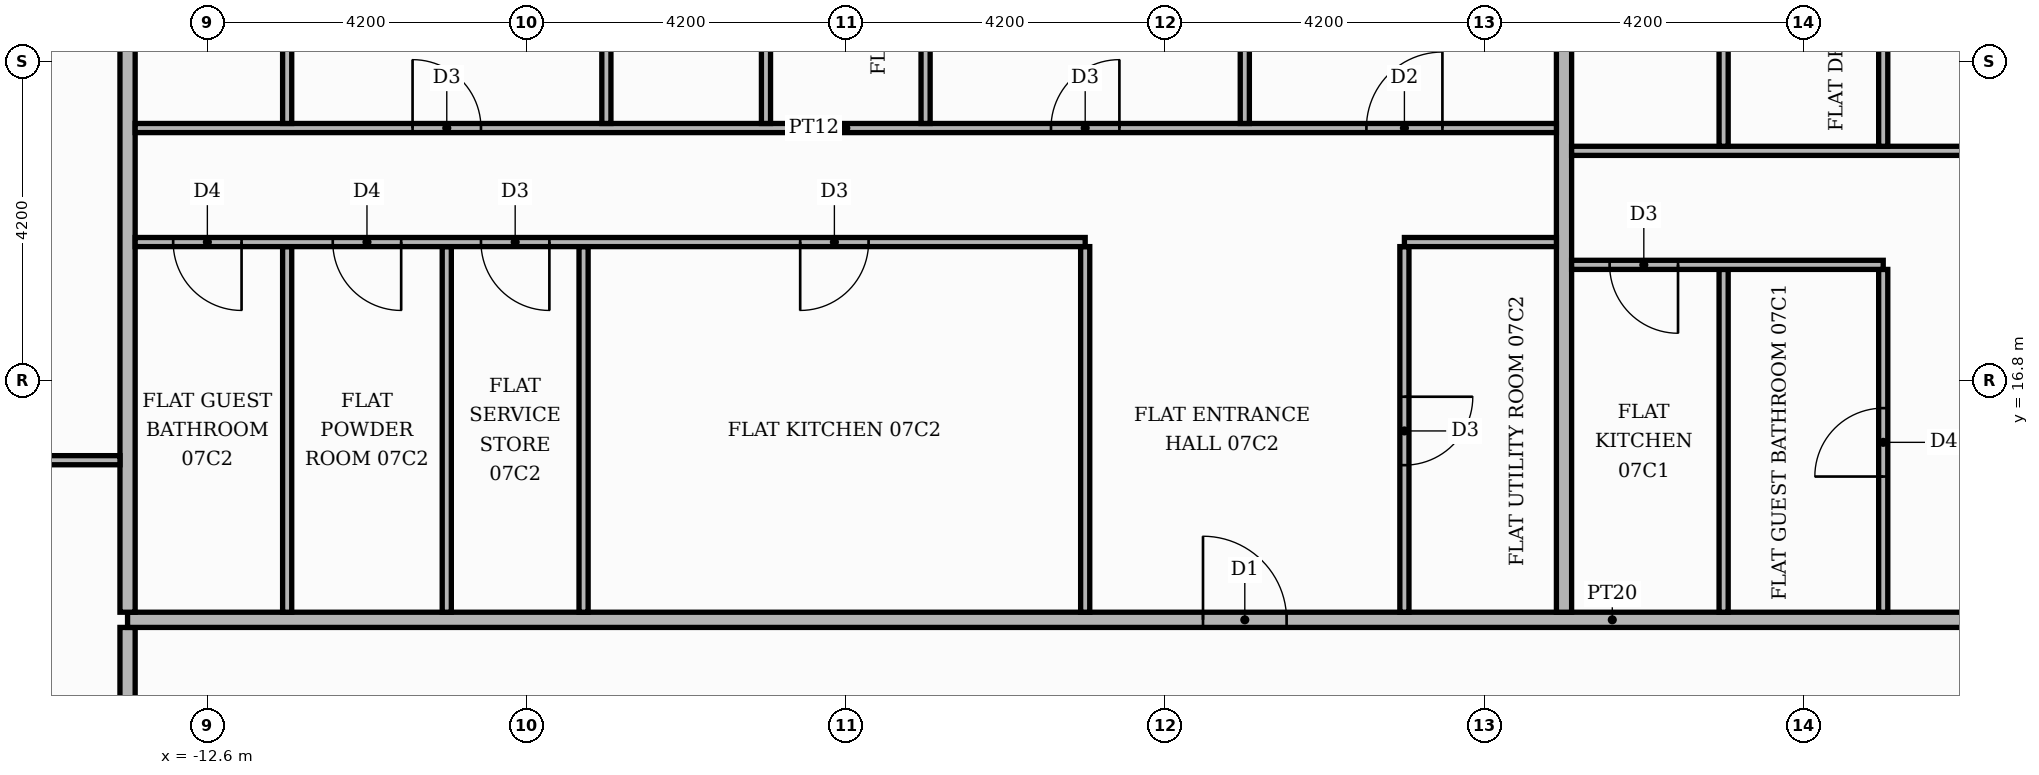
"""IFC4 building model, lengths in metres.
Left out: names, types, materials, properties, quantities, classifications, styles, units other than length and angle.
Written with IfcOpenShell. Run it as: python <this file> out.ifc"""

import sys

from ifc_helpers import new_model, si_unit, direction, frame, frame_2d, origin, place, context, subcontext, project, spatial, rectangle, extrude, element, fill, save


model = new_model("IFC4")
c1 = context("Model", 3, precision=1e-05, world=origin(), true_north=direction((0.0, 1.0)))
c2 = subcontext(c1, "Body", "Model", "MODEL_VIEW")
j1 = project(units=[si_unit("LENGTHUNIT", "METRE"), si_unit("PLANEANGLEUNIT", "RADIAN")], contexts=[c1])
p1 = place(None, origin())
s1 = spatial("IfcSite", under=j1, at=p1, CompositionType="ELEMENT")
p2 = place(p1, origin())
s2 = spatial("IfcBuilding", under=s1, at=p2, CompositionType="ELEMENT")
p3 = place(p2, frame((0.0, 0.0, 34.8)))
s3 = spatial("IfcBuildingStorey", under=s2, at=p3, CompositionType="ELEMENT", Elevation=34.8)
p4 = place(p3, frame((-13.65, -13.55, 0.0), z_axis=(0.0, 0.0, 1.0), x_axis=(0.0, 1.0, 0.0)))
e1 = element("IfcWall", 1, at=p4, inside=s3, PredefinedType="PARTITIONING", context=c2, shape_type="SweptSolid", body=[
    extrude(rectangle(XDim=27.1, YDim=0.2, at=frame_2d((13.55, 0.0))), origin(), (0.0, 0.0, 1.0), 3.48),
])
p5 = place(p4, frame((24.55, 0.0, 0.0)))
e2 = element("IfcOpeningElement", 2, at=p5, cuts=e1, PredefinedType="OPENING", context=c2, shape_type="SweptSolid", body=[
    extrude(rectangle(XDim=1.1, YDim=2.4, at=frame_2d((0.55, 1.2))), frame((0.0, 0.11, 0.0), z_axis=(0.0, -1.0, 0.0), x_axis=(1.0, 0.0, 0.0)), (0.0, 0.0, 1.0), 0.22),
])
p6 = place(p3, frame((-13.65, 13.65, 0.0), z_axis=(0.0, 0.0, 1.0), x_axis=(1.0, 0.0, 0.0)))
e3 = element("IfcWall", 3, at=p6, inside=s3, PredefinedType="PARTITIONING", context=c2, shape_type="SweptSolid", body=[
    extrude(rectangle(XDim=39.07, YDim=0.2, at=frame_2d((19.535, 0.0))), origin(), (0.0, 0.0, 1.0), 3.48),
])
p7 = place(p6, frame((24.65, 0.0, 0.0)))
e4 = element("IfcOpeningElement", 4, at=p7, cuts=e3, PredefinedType="OPENING", context=c2, shape_type="SweptSolid", body=[
    extrude(rectangle(XDim=1.1, YDim=2.4, at=frame_2d((0.55, 1.2))), frame((0.0, 0.11, 0.0), z_axis=(0.0, -1.0, 0.0), x_axis=(1.0, 0.0, 0.0)), (0.0, 0.0, 1.0), 0.22),
])
p8 = place(p6, frame((14.15, 0.0, 0.0)))
e5 = element("IfcOpeningElement", 5, at=p8, cuts=e3, PredefinedType="OPENING", context=c2, shape_type="SweptSolid", body=[
    extrude(rectangle(XDim=1.1, YDim=2.4, at=frame_2d((0.55, 1.2))), frame((0.0, 0.11, 0.0), z_axis=(0.0, -1.0, 0.0), x_axis=(1.0, 0.0, 0.0)), (0.0, 0.0, 1.0), 0.22),
])
p9 = place(p3, frame((-13.65, 13.75, 0.0), z_axis=(0.0, 0.0, 1.0), x_axis=(0.0, 1.0, 0.0)))
e6 = element("IfcWall", 6, at=p9, inside=s3, PredefinedType="PARTITIONING", context=c2, shape_type="SweptSolid", body=[
    extrude(rectangle(XDim=11.67, YDim=0.2, at=frame_2d((5.835, 0.0))), origin(), (0.0, 0.0, 1.0), 3.48),
])
for number, where, z_axis, x_axis in (
    (7, (-11.55, 13.75, 0.0), (0.0, 0.0, 1.0), (0.0, 1.0, 0.0)),
    (8, (-9.45, 13.75, 0.0), (0.0, 0.0, 1.0), (0.0, 1.0, 0.0)),
    (9, (-7.65, 13.75, 0.0), (0.0, 0.0, 1.0), (0.0, 1.0, 0.0)),
    (10, (-1.05, 13.75, 0.0), (0.0, 0.0, 1.0), (0.0, 1.0, 0.0)),
):
    element("IfcWall", number, at=place(p3, frame(where, z_axis=z_axis, x_axis=x_axis)), inside=s3, PredefinedType="PARTITIONING", context=c2, shape_type="SweptSolid", body=[
        extrude(rectangle(XDim=4.81, YDim=0.12, at=frame_2d((2.405, 0.0))), origin(), (0.0, 0.0, 1.0), 3.48),
    ])
p10 = place(p3, frame((3.15, 13.75, 0.0), z_axis=(0.0, 0.0, 1.0), x_axis=(0.0, 1.0, 0.0)))
e11 = element("IfcWall", 11, at=p10, inside=s3, PredefinedType="PARTITIONING", context=c2, shape_type="SweptSolid", body=[
    extrude(rectangle(XDim=4.81, YDim=0.12, at=frame_2d((2.405, 0.0))), origin(), (0.0, 0.0, 1.0), 3.48),
])
p11 = place(p10, frame((1.935, 0.0, 0.0)))
e12 = element("IfcOpeningElement", 12, at=p11, cuts=e11, PredefinedType="OPENING", context=c2, shape_type="SweptSolid", body=[
    extrude(rectangle(XDim=0.9, YDim=2.1, at=frame_2d((0.45, 1.05))), frame((0.0, 0.07, 0.0), z_axis=(0.0, -1.0, 0.0), x_axis=(1.0, 0.0, 0.0)), (0.0, 0.0, 1.0), 0.14),
])
p12 = place(p3, frame((5.25, 13.75, 0.0), z_axis=(0.0, 0.0, 1.0), x_axis=(0.0, 1.0, 0.0)))
e13 = element("IfcWall", 13, at=p12, inside=s3, PredefinedType="PARTITIONING", context=c2, shape_type="SweptSolid", body=[
    extrude(rectangle(XDim=11.67, YDim=0.2, at=frame_2d((5.835, 0.0))), origin(), (0.0, 0.0, 1.0), 3.48),
])
p13 = place(p3, frame((7.35, 13.75, 0.0), z_axis=(0.0, 0.0, 1.0), x_axis=(0.0, 1.0, 0.0)))
e14 = element("IfcWall", 14, at=p13, inside=s3, PredefinedType="PARTITIONING", context=c2, shape_type="SweptSolid", body=[
    extrude(rectangle(XDim=4.51, YDim=0.12, at=frame_2d((2.255, 0.0))), origin(), (0.0, 0.0, 1.0), 3.48),
])
p14 = place(p3, frame((9.45, 13.75, 0.0), z_axis=(0.0, 0.0, 1.0), x_axis=(0.0, 1.0, 0.0)))
e15 = element("IfcWall", 15, at=p14, inside=s3, PredefinedType="PARTITIONING", context=c2, shape_type="SweptSolid", body=[
    extrude(rectangle(XDim=4.51, YDim=0.12, at=frame_2d((2.255, 0.0))), origin(), (0.0, 0.0, 1.0), 3.48),
])
p15 = place(p14, frame((1.785, 0.0, 0.0)))
e16 = element("IfcOpeningElement", 16, at=p15, cuts=e15, PredefinedType="OPENING", context=c2, shape_type="SweptSolid", body=[
    extrude(rectangle(XDim=0.9, YDim=2.1, at=frame_2d((0.45, 1.05))), frame((0.0, 0.07, 0.0), z_axis=(0.0, -1.0, 0.0), x_axis=(1.0, 0.0, 0.0)), (0.0, 0.0, 1.0), 0.14),
])
p16 = place(p3, frame((-20.12, 15.75, 0.0), z_axis=(0.0, 0.0, 1.0), x_axis=(1.0, 0.0, 0.0)))
e17 = element("IfcWall", 17, at=p16, inside=s3, PredefinedType="PARTITIONING", context=c2, shape_type="SweptSolid", body=[
    extrude(rectangle(XDim=6.37, YDim=0.12, at=frame_2d((3.185, 0.0))), origin(), (0.0, 0.0, 1.0), 3.48),
])
p17 = place(p16, frame((2.785, 0.0, 0.0)))
e18 = element("IfcOpeningElement", 18, at=p17, cuts=e17, PredefinedType="OPENING", context=c2, shape_type="SweptSolid", body=[
    extrude(rectangle(XDim=0.9, YDim=2.1, at=frame_2d((0.45, 1.05))), frame((0.0, 0.07, 0.0), z_axis=(0.0, -1.0, 0.0), x_axis=(1.0, 0.0, 0.0)), (0.0, 0.0, 1.0), 0.14),
])
p18 = place(p3, frame((5.35, 18.32, 0.0), z_axis=(0.0, 0.0, 1.0), x_axis=(1.0, 0.0, 0.0)))
e19 = element("IfcWall", 19, at=p18, inside=s3, PredefinedType="PARTITIONING", context=c2, shape_type="SweptSolid", body=[
    extrude(rectangle(XDim=4.1, YDim=0.12, at=frame_2d((2.05, 0.0))), origin(), (0.0, 0.0, 1.0), 3.48),
])
p19 = place(p18, frame((0.5, 0.0, 0.0)))
e20 = element("IfcOpeningElement", 20, at=p19, cuts=e19, PredefinedType="OPENING", context=c2, shape_type="SweptSolid", body=[
    extrude(rectangle(XDim=0.9, YDim=2.1, at=frame_2d((0.45, 1.05))), frame((0.0, 0.07, 0.0), z_axis=(0.0, -1.0, 0.0), x_axis=(1.0, 0.0, 0.0)), (0.0, 0.0, 1.0), 0.14),
])
p20 = place(p3, frame((-13.55, 18.62, 0.0), z_axis=(0.0, 0.0, 1.0), x_axis=(1.0, 0.0, 0.0)))
e21 = element("IfcWall", 21, at=p20, inside=s3, PredefinedType="PARTITIONING", context=c2, shape_type="SweptSolid", body=[
    extrude(rectangle(XDim=12.5, YDim=0.12, at=frame_2d((6.25, 0.0))), origin(), (0.0, 0.0, 1.0), 3.48),
])
p21 = place(p20, frame((8.75, 0.0, 0.0)))
e22 = element("IfcOpeningElement", 22, at=p21, cuts=e21, PredefinedType="OPENING", context=c2, shape_type="SweptSolid", body=[
    extrude(rectangle(XDim=0.9, YDim=2.1, at=frame_2d((0.45, 1.05))), frame((0.0, 0.07, 0.0), z_axis=(0.0, -1.0, 0.0), x_axis=(1.0, 0.0, 0.0)), (0.0, 0.0, 1.0), 0.14),
])
p22 = place(p20, frame((4.55, 0.0, 0.0)))
e23 = element("IfcOpeningElement", 23, at=p22, cuts=e21, PredefinedType="OPENING", context=c2, shape_type="SweptSolid", body=[
    extrude(rectangle(XDim=0.9, YDim=2.1, at=frame_2d((0.45, 1.05))), frame((0.0, 0.07, 0.0), z_axis=(0.0, -1.0, 0.0), x_axis=(1.0, 0.0, 0.0)), (0.0, 0.0, 1.0), 0.14),
])
p23 = place(p20, frame((2.6, 0.0, 0.0)))
e24 = element("IfcOpeningElement", 24, at=p23, cuts=e21, PredefinedType="OPENING", context=c2, shape_type="SweptSolid", body=[
    extrude(rectangle(XDim=0.9, YDim=2.1, at=frame_2d((0.45, 1.05))), frame((0.0, 0.07, 0.0), z_axis=(0.0, -1.0, 0.0), x_axis=(1.0, 0.0, 0.0)), (0.0, 0.0, 1.0), 0.14),
])
p24 = place(p20, frame((0.5, 0.0, 0.0)))
e25 = element("IfcOpeningElement", 25, at=p24, cuts=e21, PredefinedType="OPENING", context=c2, shape_type="SweptSolid", body=[
    extrude(rectangle(XDim=0.9, YDim=2.1, at=frame_2d((0.45, 1.05))), frame((0.0, 0.07, 0.0), z_axis=(0.0, -1.0, 0.0), x_axis=(1.0, 0.0, 0.0)), (0.0, 0.0, 1.0), 0.14),
])
p25 = place(p3, frame((3.15, 18.62, 0.0), z_axis=(0.0, 0.0, 1.0), x_axis=(1.0, 0.0, 0.0)))
e26 = element("IfcWall", 26, at=p25, inside=s3, PredefinedType="PARTITIONING", context=c2, shape_type="SweptSolid", body=[
    extrude(rectangle(XDim=2.0, YDim=0.12, at=frame_2d((1.0, 0.0))), origin(), (0.0, 0.0, 1.0), 3.48),
])
p26 = place(p3, frame((5.35, 19.82, 0.0), z_axis=(0.0, 0.0, 1.0), x_axis=(1.0, 0.0, 0.0)))
e27 = element("IfcWall", 27, at=p26, inside=s3, PredefinedType="PARTITIONING", context=c2, shape_type="SweptSolid", body=[
    extrude(rectangle(XDim=11.95, YDim=0.12, at=frame_2d((5.975, 0.0))), origin(), (0.0, 0.0, 1.0), 3.48),
])
p27 = place(p26, frame((8.85, 0.0, 0.0)))
e28 = element("IfcOpeningElement", 28, at=p27, cuts=e27, PredefinedType="OPENING", context=c2, shape_type="SweptSolid", body=[
    extrude(rectangle(XDim=1.0, YDim=2.1, at=frame_2d((0.5, 1.05))), frame((0.0, 0.07, 0.0), z_axis=(0.0, -1.0, 0.0), x_axis=(1.0, 0.0, 0.0)), (0.0, 0.0, 1.0), 0.14),
])
p28 = place(p26, frame((5.75, 0.0, 0.0)))
e29 = element("IfcOpeningElement", 29, at=p28, cuts=e27, PredefinedType="OPENING", context=c2, shape_type="SweptSolid", body=[
    extrude(rectangle(XDim=0.9, YDim=2.1, at=frame_2d((0.45, 1.05))), frame((0.0, 0.07, 0.0), z_axis=(0.0, -1.0, 0.0), x_axis=(1.0, 0.0, 0.0)), (0.0, 0.0, 1.0), 0.14),
])
p29 = place(p3, frame((7.35, 19.88, 0.0), z_axis=(0.0, 0.0, 1.0), x_axis=(0.0, 1.0, 0.0)))
e30 = element("IfcWall", 30, at=p29, inside=s3, PredefinedType="PARTITIONING", context=c2, shape_type="SweptSolid", body=[
    extrude(rectangle(XDim=5.54, YDim=0.12, at=frame_2d((2.77, 0.0))), origin(), (0.0, 0.0, 1.0), 3.48),
])
p30 = place(p29, frame((2.44, 0.0, 0.0)))
e31 = element("IfcOpeningElement", 31, at=p30, cuts=e30, PredefinedType="OPENING", context=c2, shape_type="SweptSolid", body=[
    extrude(rectangle(XDim=0.9, YDim=2.1, at=frame_2d((0.45, 1.05))), frame((0.0, 0.07, 0.0), z_axis=(0.0, -1.0, 0.0), x_axis=(1.0, 0.0, 0.0)), (0.0, 0.0, 1.0), 0.14),
])
p31 = place(p3, frame((9.45, 19.88, 0.0), z_axis=(0.0, 0.0, 1.0), x_axis=(0.0, 1.0, 0.0)))
e32 = element("IfcWall", 32, at=p31, inside=s3, PredefinedType="PARTITIONING", context=c2, shape_type="SweptSolid", body=[
    extrude(rectangle(XDim=5.54, YDim=0.12, at=frame_2d((2.77, 0.0))), origin(), (0.0, 0.0, 1.0), 3.48),
])
p32 = place(p31, frame((2.44, 0.0, 0.0)))
e33 = element("IfcOpeningElement", 33, at=p32, cuts=e32, PredefinedType="OPENING", context=c2, shape_type="SweptSolid", body=[
    extrude(rectangle(XDim=0.9, YDim=2.1, at=frame_2d((0.45, 1.05))), frame((0.0, 0.07, 0.0), z_axis=(0.0, -1.0, 0.0), x_axis=(1.0, 0.0, 0.0)), (0.0, 0.0, 1.0), 0.14),
])
p33 = place(p3, frame((-13.55, 20.12, 0.0), z_axis=(0.0, 0.0, 1.0), x_axis=(1.0, 0.0, 0.0)))
e34 = element("IfcWall", 34, at=p33, inside=s3, PredefinedType="PARTITIONING", context=c2, shape_type="SweptSolid", body=[
    extrude(rectangle(XDim=18.7, YDim=0.12, at=frame_2d((9.35, 0.0))), origin(), (0.0, 0.0, 1.0), 3.48),
])
p34 = place(p33, frame((16.2, 0.0, 0.0)))
e35 = element("IfcOpeningElement", 35, at=p34, cuts=e34, PredefinedType="OPENING", context=c2, shape_type="SweptSolid", body=[
    extrude(rectangle(XDim=1.0, YDim=2.1, at=frame_2d((0.5, 1.05))), frame((0.0, 0.07, 0.0), z_axis=(0.0, -1.0, 0.0), x_axis=(1.0, 0.0, 0.0)), (0.0, 0.0, 1.0), 0.14),
])
p35 = place(p33, frame((12.05, 0.0, 0.0)))
e36 = element("IfcOpeningElement", 36, at=p35, cuts=e34, PredefinedType="OPENING", context=c2, shape_type="SweptSolid", body=[
    extrude(rectangle(XDim=0.9, YDim=2.1, at=frame_2d((0.45, 1.05))), frame((0.0, 0.07, 0.0), z_axis=(0.0, -1.0, 0.0), x_axis=(1.0, 0.0, 0.0)), (0.0, 0.0, 1.0), 0.14),
])
p36 = place(p33, frame((3.65, 0.0, 0.0)))
e37 = element("IfcOpeningElement", 37, at=p36, cuts=e34, PredefinedType="OPENING", context=c2, shape_type="SweptSolid", body=[
    extrude(rectangle(XDim=0.9, YDim=2.1, at=frame_2d((0.45, 1.05))), frame((0.0, 0.07, 0.0), z_axis=(0.0, -1.0, 0.0), x_axis=(1.0, 0.0, 0.0)), (0.0, 0.0, 1.0), 0.14),
])
p37 = place(p3, frame((-11.55, 20.18, 0.0), z_axis=(0.0, 0.0, 1.0), x_axis=(0.0, 1.0, 0.0)))
e38 = element("IfcWall", 38, at=p37, inside=s3, PredefinedType="PARTITIONING", context=c2, shape_type="SweptSolid", body=[
    extrude(rectangle(XDim=5.24, YDim=0.12, at=frame_2d((2.62, 0.0))), origin(), (0.0, 0.0, 1.0), 3.48),
])
p38 = place(p37, frame((2.29, 0.0, 0.0)))
e39 = element("IfcOpeningElement", 39, at=p38, cuts=e38, PredefinedType="OPENING", context=c2, shape_type="SweptSolid", body=[
    extrude(rectangle(XDim=0.9, YDim=2.1, at=frame_2d((0.45, 1.05))), frame((0.0, 0.07, 0.0), z_axis=(0.0, -1.0, 0.0), x_axis=(1.0, 0.0, 0.0)), (0.0, 0.0, 1.0), 0.14),
])
p39 = place(p3, frame((-7.35, 20.18, 0.0), z_axis=(0.0, 0.0, 1.0), x_axis=(0.0, 1.0, 0.0)))
e40 = element("IfcWall", 40, at=p39, inside=s3, PredefinedType="PARTITIONING", context=c2, shape_type="SweptSolid", body=[
    extrude(rectangle(XDim=5.24, YDim=0.12, at=frame_2d((2.62, 0.0))), origin(), (0.0, 0.0, 1.0), 3.48),
])
p40 = place(p3, frame((-5.25, 20.18, 0.0), z_axis=(0.0, 0.0, 1.0), x_axis=(0.0, 1.0, 0.0)))
e41 = element("IfcWall", 41, at=p40, inside=s3, PredefinedType="PARTITIONING", context=c2, shape_type="SweptSolid", body=[
    extrude(rectangle(XDim=5.24, YDim=0.12, at=frame_2d((2.62, 0.0))), origin(), (0.0, 0.0, 1.0), 3.48),
])
p41 = place(p40, frame((2.29, 0.0, 0.0)))
e42 = element("IfcOpeningElement", 42, at=p41, cuts=e41, PredefinedType="OPENING", context=c2, shape_type="SweptSolid", body=[
    extrude(rectangle(XDim=0.9, YDim=2.1, at=frame_2d((0.45, 1.05))), frame((0.0, 0.07, 0.0), z_axis=(0.0, -1.0, 0.0), x_axis=(1.0, 0.0, 0.0)), (0.0, 0.0, 1.0), 0.14),
])
p42 = place(p3, frame((-3.15, 20.18, 0.0), z_axis=(0.0, 0.0, 1.0), x_axis=(0.0, 1.0, 0.0)))
e43 = element("IfcWall", 43, at=p42, inside=s3, PredefinedType="PARTITIONING", context=c2, shape_type="SweptSolid", body=[
    extrude(rectangle(XDim=5.24, YDim=0.12, at=frame_2d((2.62, 0.0))), origin(), (0.0, 0.0, 1.0), 3.48),
])
p43 = place(p42, frame((2.29, 0.0, 0.0)))
e44 = element("IfcOpeningElement", 44, at=p43, cuts=e43, PredefinedType="OPENING", context=c2, shape_type="SweptSolid", body=[
    extrude(rectangle(XDim=0.9, YDim=2.1, at=frame_2d((0.45, 1.05))), frame((0.0, 0.07, 0.0), z_axis=(0.0, -1.0, 0.0), x_axis=(1.0, 0.0, 0.0)), (0.0, 0.0, 1.0), 0.14),
])
p44 = place(p3, frame((1.05, 20.18, 0.0), z_axis=(0.0, 0.0, 1.0), x_axis=(0.0, 1.0, 0.0)))
e45 = element("IfcWall", 45, at=p44, inside=s3, PredefinedType="PARTITIONING", context=c2, shape_type="SweptSolid", body=[
    extrude(rectangle(XDim=5.24, YDim=0.12, at=frame_2d((2.62, 0.0))), origin(), (0.0, 0.0, 1.0), 3.48),
])
p45 = place(p15, origin())
e46 = element("IfcDoor", 46, at=p45, inside=s3, OperationType="SINGLE_SWING_LEFT", PredefinedType="DOOR", context=c2, shape_type="SweptSolid", body=[
    extrude(rectangle(XDim=0.9, YDim=2.1, at=frame_2d((0.45, 1.05))), frame((0.0, 0.025, 0.0), z_axis=(0.0, -1.0, 0.0), x_axis=(1.0, 0.0, 0.0)), (0.0, 0.0, 1.0), 0.05),
])
fill(e16, e46)
p46 = place(p19, frame((0.9, 0.0, 0.0), z_axis=(0.0, 0.0, 1.0), x_axis=(-1.0, 0.0, 0.0)))
e47 = element("IfcDoor", 47, at=p46, inside=s3, OperationType="SINGLE_SWING_RIGHT", PredefinedType="DOOR", context=c2, shape_type="SweptSolid", body=[
    extrude(rectangle(XDim=0.9, YDim=2.1, at=frame_2d((0.45, 1.05))), frame((0.0, 0.025, 0.0), z_axis=(0.0, -1.0, 0.0), x_axis=(1.0, 0.0, 0.0)), (0.0, 0.0, 1.0), 0.05),
])
fill(e20, e47)
p47 = place(p8, origin())
e48 = element("IfcDoor", 48, at=p47, inside=s3, OperationType="SINGLE_SWING_LEFT", PredefinedType="DOOR", context=c2, shape_type="SweptSolid", body=[
    extrude(rectangle(XDim=1.1, YDim=2.4, at=frame_2d((0.55, 1.2))), frame((0.0, 0.025, 0.0), z_axis=(0.0, -1.0, 0.0), x_axis=(1.0, 0.0, 0.0)), (0.0, 0.0, 1.0), 0.05),
])
fill(e5, e48)
p48 = place(p11, frame((0.9, 0.0, 0.0), z_axis=(0.0, 0.0, 1.0), x_axis=(-1.0, 0.0, 0.0)))
e49 = element("IfcDoor", 49, at=p48, inside=s3, OperationType="SINGLE_SWING_RIGHT", PredefinedType="DOOR", context=c2, shape_type="SweptSolid", body=[
    extrude(rectangle(XDim=0.9, YDim=2.1, at=frame_2d((0.45, 1.05))), frame((0.0, 0.025, 0.0), z_axis=(0.0, -1.0, 0.0), x_axis=(1.0, 0.0, 0.0)), (0.0, 0.0, 1.0), 0.05),
])
fill(e12, e49)
p49 = place(p21, frame((0.9, 0.0, 0.0), z_axis=(0.0, 0.0, 1.0), x_axis=(-1.0, 0.0, 0.0)))
e50 = element("IfcDoor", 50, at=p49, inside=s3, OperationType="SINGLE_SWING_LEFT", PredefinedType="DOOR", context=c2, shape_type="SweptSolid", body=[
    extrude(rectangle(XDim=0.9, YDim=2.1, at=frame_2d((0.45, 1.05))), frame((0.0, 0.025, 0.0), z_axis=(0.0, -1.0, 0.0), x_axis=(1.0, 0.0, 0.0)), (0.0, 0.0, 1.0), 0.05),
])
fill(e22, e50)
p50 = place(p22, frame((0.9, 0.0, 0.0), z_axis=(0.0, 0.0, 1.0), x_axis=(-1.0, 0.0, 0.0)))
e51 = element("IfcDoor", 51, at=p50, inside=s3, OperationType="SINGLE_SWING_RIGHT", PredefinedType="DOOR", context=c2, shape_type="SweptSolid", body=[
    extrude(rectangle(XDim=0.9, YDim=2.1, at=frame_2d((0.45, 1.05))), frame((0.0, 0.025, 0.0), z_axis=(0.0, -1.0, 0.0), x_axis=(1.0, 0.0, 0.0)), (0.0, 0.0, 1.0), 0.05),
])
fill(e23, e51)
p51 = place(p23, frame((0.9, 0.0, 0.0), z_axis=(0.0, 0.0, 1.0), x_axis=(-1.0, 0.0, 0.0)))
e52 = element("IfcDoor", 52, at=p51, inside=s3, OperationType="SINGLE_SWING_RIGHT", PredefinedType="DOOR", context=c2, shape_type="SweptSolid", body=[
    extrude(rectangle(XDim=0.9, YDim=2.1, at=frame_2d((0.45, 1.05))), frame((0.0, 0.025, 0.0), z_axis=(0.0, -1.0, 0.0), x_axis=(1.0, 0.0, 0.0)), (0.0, 0.0, 1.0), 0.05),
])
fill(e24, e52)
p52 = place(p24, frame((0.9, 0.0, 0.0), z_axis=(0.0, 0.0, 1.0), x_axis=(-1.0, 0.0, 0.0)))
e53 = element("IfcDoor", 53, at=p52, inside=s3, OperationType="SINGLE_SWING_RIGHT", PredefinedType="DOOR", context=c2, shape_type="SweptSolid", body=[
    extrude(rectangle(XDim=0.9, YDim=2.1, at=frame_2d((0.45, 1.05))), frame((0.0, 0.025, 0.0), z_axis=(0.0, -1.0, 0.0), x_axis=(1.0, 0.0, 0.0)), (0.0, 0.0, 1.0), 0.05),
])
fill(e25, e53)
p53 = place(p34, origin())
e54 = element("IfcDoor", 54, at=p53, inside=s3, OperationType="SINGLE_SWING_RIGHT", PredefinedType="DOOR", context=c2, shape_type="SweptSolid", body=[
    extrude(rectangle(XDim=1.0, YDim=2.1, at=frame_2d((0.5, 1.05))), frame((0.0, 0.025, 0.0), z_axis=(0.0, -1.0, 0.0), x_axis=(1.0, 0.0, 0.0)), (0.0, 0.0, 1.0), 0.05),
])
fill(e35, e54)
p54 = place(p35, origin())
e55 = element("IfcDoor", 55, at=p54, inside=s3, OperationType="SINGLE_SWING_RIGHT", PredefinedType="DOOR", context=c2, shape_type="SweptSolid", body=[
    extrude(rectangle(XDim=0.9, YDim=2.1, at=frame_2d((0.45, 1.05))), frame((0.0, 0.025, 0.0), z_axis=(0.0, -1.0, 0.0), x_axis=(1.0, 0.0, 0.0)), (0.0, 0.0, 1.0), 0.05),
])
fill(e36, e55)
p55 = place(p36, origin())
e56 = element("IfcDoor", 56, at=p55, inside=s3, OperationType="SINGLE_SWING_LEFT", PredefinedType="DOOR", context=c2, shape_type="SweptSolid", body=[
    extrude(rectangle(XDim=0.9, YDim=2.1, at=frame_2d((0.45, 1.05))), frame((0.0, 0.025, 0.0), z_axis=(0.0, -1.0, 0.0), x_axis=(1.0, 0.0, 0.0)), (0.0, 0.0, 1.0), 0.05),
])
fill(e37, e56)
save(model, sys.argv[1])
